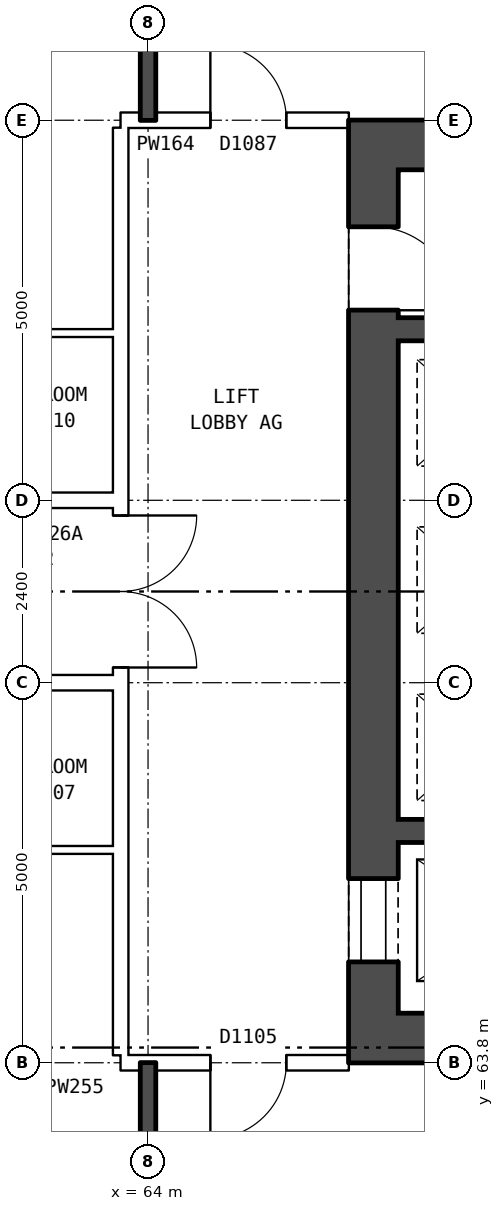
"""IFC4 building model, lengths in metres.
Left out: names, types, materials, properties, quantities, classifications, styles, units other than length and angle.
Written with IfcOpenShell. Run it as: python <this file> out.ifc"""

import sys

from ifc_helpers import new_model, si_unit, direction, frame, frame_2d, origin, place, context, subcontext, project, spatial, rectangle, extrude, element, fill, save


model = new_model("IFC4")
c1 = context("Model", 3, precision=1e-05, world=origin(), true_north=direction((0.0, 1.0)))
c2 = subcontext(c1, "Body", "Model", "MODEL_VIEW")
j1 = project(units=[si_unit("LENGTHUNIT", "METRE"), si_unit("PLANEANGLEUNIT", "RADIAN")], contexts=[c1])
p1 = place(None, origin())
s1 = spatial("IfcSite", under=j1, at=p1, CompositionType="ELEMENT")
p2 = place(p1, origin())
s2 = spatial("IfcBuilding", under=s1, at=p2, CompositionType="ELEMENT")
p3 = place(p2, frame((0.0, 0.0, 96.4)))
s3 = spatial("IfcBuildingStorey", under=s2, at=p3, CompositionType="ELEMENT", Elevation=96.4)
p4 = place(p3, frame((66.965, 64.45, 0.0), z_axis=(0.0, 0.0, 1.0), x_axis=(0.0, 1.0, 0.0)))
e1 = element("IfcWall", 1, at=p4, inside=s3, PredefinedType="SHEAR", context=c2, shape_type="SweptSolid", body=[
    extrude(rectangle(XDim=11.1, YDim=0.65, at=frame_2d((5.55, 0.0))), origin(), (0.0, 0.0, 1.0), 2.85),
])
p5 = place(p4, frame((0.675, 0.0, 0.0)))
e2 = element("IfcOpeningElement", 2, at=p5, cuts=e1, PredefinedType="OPENING", context=c2, shape_type="SweptSolid", body=[
    extrude(rectangle(XDim=1.1, YDim=2.1, at=frame_2d((0.55, 1.05))), frame((0.0, 0.335, 0.0), z_axis=(0.0, -1.0, 0.0), x_axis=(1.0, 0.0, 0.0)), (0.0, 0.0, 1.0), 0.67),
])
p6 = place(p4, frame((9.25, 0.0, 0.0)))
e3 = element("IfcOpeningElement", 3, at=p6, cuts=e1, PredefinedType="OPENING", context=c2, shape_type="SweptSolid", body=[
    extrude(rectangle(XDim=1.1, YDim=2.1, at=frame_2d((0.55, 1.05))), frame((0.0, 0.335, 0.0), z_axis=(0.0, -1.0, 0.0), x_axis=(1.0, 0.0, 0.0)), (0.0, 0.0, 1.0), 0.67),
])
for number, where, z_axis, x_axis in (
    (4, (66.64, 64.125, 0.0), (0.0, 0.0, 1.0), (1.0, 0.0, 0.0)),
    (5, (66.64, 75.875, 0.0), (0.0, 0.0, 1.0), (1.0, 0.0, 0.0)),
):
    element("IfcWall", number, at=place(p3, frame(where, z_axis=z_axis, x_axis=x_axis)), inside=s3, PredefinedType="SHEAR", context=c2, shape_type="SweptSolid", body=[
        extrude(rectangle(XDim=9.0, YDim=0.65, at=frame_2d((4.5, 0.0))), origin(), (0.0, 0.0, 1.0), 2.85),
    ])
p7 = place(p3, frame((67.29, 66.85, 0.0), z_axis=(0.0, 0.0, 1.0), x_axis=(1.0, 0.0, 0.0)))
e6 = element("IfcWall", 6, at=p7, inside=s3, PredefinedType="SHEAR", context=c2, shape_type="SweptSolid", body=[
    extrude(rectangle(XDim=3.37, YDim=0.3, at=frame_2d((1.685, 0.0))), origin(), (0.0, 0.0, 1.0), 2.85),
])
p8 = place(p3, frame((67.29, 73.45, 0.0), z_axis=(0.0, 0.0, 1.0), x_axis=(1.0, 0.0, 0.0)))
e7 = element("IfcWall", 7, at=p8, inside=s3, PredefinedType="SHEAR", context=c2, shape_type="SweptSolid", body=[
    extrude(rectangle(XDim=2.25, YDim=0.3, at=frame_2d((1.125, 0.0))), origin(), (0.0, 0.0, 1.0), 2.85),
])
p9 = place(p3, frame((63.64, 63.9, 0.0), z_axis=(0.0, 0.0, 1.0), x_axis=(0.0, 1.0, 0.0)))
e8 = element("IfcWall", 8, at=p9, inside=s3, PredefinedType="PARTITIONING", context=c2, shape_type="SweptSolid", body=[
    extrude(rectangle(XDim=12.2, YDim=0.2, at=frame_2d((6.1, 0.0))), origin(), (0.0, 0.0, 1.0), 2.85),
])
p10 = place(p9, frame((5.1, 0.0, 0.0)))
e9 = element("IfcOpeningElement", 9, at=p10, cuts=e8, PredefinedType="OPENING", context=c2, shape_type="SweptSolid", body=[
    extrude(rectangle(XDim=2.0, YDim=2.1, at=frame_2d((1.0, 1.05))), frame((0.0, 0.11, 0.0), z_axis=(0.0, -1.0, 0.0), x_axis=(1.0, 0.0, 0.0)), (0.0, 0.0, 1.0), 0.22),
])
p11 = place(p3, frame((63.64, 63.8, 0.0), z_axis=(0.0, 0.0, 1.0), x_axis=(1.0, 0.0, 0.0)))
e10 = element("IfcWall", 10, at=p11, inside=s3, PredefinedType="PARTITIONING", context=c2, shape_type="SweptSolid", body=[
    extrude(rectangle(XDim=3.0, YDim=0.2, at=frame_2d((1.5, 0.0))), origin(), (0.0, 0.0, 1.0), 2.85),
])
p12 = place(p11, frame((1.18, 0.0, 0.0)))
e11 = element("IfcOpeningElement", 11, at=p12, cuts=e10, PredefinedType="OPENING", context=c2, shape_type="SweptSolid", body=[
    extrude(rectangle(XDim=1.0, YDim=2.1, at=frame_2d((0.5, 1.05))), frame((0.0, 0.11, 0.0), z_axis=(0.0, -1.0, 0.0), x_axis=(1.0, 0.0, 0.0)), (0.0, 0.0, 1.0), 0.22),
])
p13 = place(p3, frame((61.0, 66.6, 0.0), z_axis=(0.0, 0.0, 1.0), x_axis=(1.0, 0.0, 0.0)))
e12 = element("IfcWall", 12, at=p13, inside=s3, PredefinedType="PARTITIONING", context=c2, shape_type="SweptSolid", body=[
    extrude(rectangle(XDim=2.64, YDim=0.1, at=frame_2d((1.32, 0.0))), origin(), (0.0, 0.0, 1.0), 2.85),
])
p14 = place(p3, frame((44.36, 68.8, 0.0), z_axis=(0.0, 0.0, 1.0), x_axis=(1.0, 0.0, 0.0)))
e13 = element("IfcWall", 13, at=p14, inside=s3, PredefinedType="PARTITIONING", context=c2, shape_type="SweptSolid", body=[
    extrude(rectangle(XDim=19.28, YDim=0.2, at=frame_2d((9.64, 0.0))), origin(), (0.0, 0.0, 1.0), 2.85),
])
p15 = place(p14, frame((14.64, 0.0, 0.0)))
e14 = element("IfcOpeningElement", 14, at=p15, cuts=e13, PredefinedType="OPENING", context=c2, shape_type="SweptSolid", body=[
    extrude(rectangle(XDim=1.0, YDim=2.1, at=frame_2d((0.5, 1.05))), frame((0.0, 0.11, 0.0), z_axis=(0.0, -1.0, 0.0), x_axis=(1.0, 0.0, 0.0)), (0.0, 0.0, 1.0), 0.22),
])
p16 = place(p14, frame((11.64, 0.0, 0.0)))
e15 = element("IfcOpeningElement", 15, at=p16, cuts=e13, PredefinedType="OPENING", context=c2, shape_type="SweptSolid", body=[
    extrude(rectangle(XDim=1.0, YDim=2.1, at=frame_2d((0.5, 1.05))), frame((0.0, 0.11, 0.0), z_axis=(0.0, -1.0, 0.0), x_axis=(1.0, 0.0, 0.0)), (0.0, 0.0, 1.0), 0.22),
])
p17 = place(p14, frame((5.64, 0.0, 0.0)))
e16 = element("IfcOpeningElement", 16, at=p17, cuts=e13, PredefinedType="OPENING", context=c2, shape_type="SweptSolid", body=[
    extrude(rectangle(XDim=1.0, YDim=2.1, at=frame_2d((0.5, 1.05))), frame((0.0, 0.11, 0.0), z_axis=(0.0, -1.0, 0.0), x_axis=(1.0, 0.0, 0.0)), (0.0, 0.0, 1.0), 0.22),
])
p18 = place(p3, frame((44.36, 71.2, 0.0), z_axis=(0.0, 0.0, 1.0), x_axis=(1.0, 0.0, 0.0)))
e17 = element("IfcWall", 17, at=p18, inside=s3, PredefinedType="PARTITIONING", context=c2, shape_type="SweptSolid", body=[
    extrude(rectangle(XDim=19.28, YDim=0.2, at=frame_2d((9.64, 0.0))), origin(), (0.0, 0.0, 1.0), 2.85),
])
p19 = place(p18, frame((14.64, 0.0, 0.0)))
e18 = element("IfcOpeningElement", 18, at=p19, cuts=e17, PredefinedType="OPENING", context=c2, shape_type="SweptSolid", body=[
    extrude(rectangle(XDim=1.0, YDim=2.1, at=frame_2d((0.5, 1.05))), frame((0.0, 0.11, 0.0), z_axis=(0.0, -1.0, 0.0), x_axis=(1.0, 0.0, 0.0)), (0.0, 0.0, 1.0), 0.22),
])
p20 = place(p18, frame((5.64, 0.0, 0.0)))
e19 = element("IfcOpeningElement", 19, at=p20, cuts=e17, PredefinedType="OPENING", context=c2, shape_type="SweptSolid", body=[
    extrude(rectangle(XDim=1.0, YDim=2.1, at=frame_2d((0.5, 1.05))), frame((0.0, 0.11, 0.0), z_axis=(0.0, -1.0, 0.0), x_axis=(1.0, 0.0, 0.0)), (0.0, 0.0, 1.0), 0.22),
])
p21 = place(p3, frame((61.0, 73.4, 0.0), z_axis=(0.0, 0.0, 1.0), x_axis=(1.0, 0.0, 0.0)))
e20 = element("IfcWall", 20, at=p21, inside=s3, PredefinedType="PARTITIONING", context=c2, shape_type="SweptSolid", body=[
    extrude(rectangle(XDim=2.64, YDim=0.1, at=frame_2d((1.32, 0.0))), origin(), (0.0, 0.0, 1.0), 2.85),
])
p22 = place(p3, frame((63.64, 76.2, 0.0), z_axis=(0.0, 0.0, 1.0), x_axis=(1.0, 0.0, 0.0)))
e21 = element("IfcWall", 21, at=p22, inside=s3, PredefinedType="PARTITIONING", context=c2, shape_type="SweptSolid", body=[
    extrude(rectangle(XDim=3.0, YDim=0.2, at=frame_2d((1.5, 0.0))), origin(), (0.0, 0.0, 1.0), 2.85),
])
p23 = place(p22, frame((1.18, 0.0, 0.0)))
e22 = element("IfcOpeningElement", 22, at=p23, cuts=e21, PredefinedType="OPENING", context=c2, shape_type="SweptSolid", body=[
    extrude(rectangle(XDim=1.0, YDim=2.1, at=frame_2d((0.5, 1.05))), frame((0.0, 0.11, 0.0), z_axis=(0.0, -1.0, 0.0), x_axis=(1.0, 0.0, 0.0)), (0.0, 0.0, 1.0), 0.22),
])
for number, where, z_axis, x_axis in (
    (23, (64.0, 54.36, 0.0), (0.0, 0.0, 1.0), (0.0, 1.0, 0.0)),
    (24, (64.0, 76.2, 0.0), (0.0, 0.0, 1.0), (0.0, 1.0, 0.0)),
):
    element("IfcWall", number, at=place(p3, frame(where, z_axis=z_axis, x_axis=x_axis)), inside=s3, PredefinedType="SOLIDWALL", context=c2, shape_type="SweptSolid", body=[
        extrude(rectangle(XDim=9.44, YDim=0.2, at=frame_2d((4.72, 0.0))), origin(), (0.0, 0.0, 1.0), 2.85),
    ])
p24 = place(p5, origin())
e25 = element("IfcDoor", 25, at=p24, inside=s3, OperationType="DOUBLE_DOOR_SLIDING", PredefinedType="DOOR", context=c2, shape_type="SweptSolid", body=[
    extrude(rectangle(XDim=1.1, YDim=2.1, at=frame_2d((0.55, 1.05))), frame((0.0, -0.26, 0.0), z_axis=(0.0, -1.0, 0.0), x_axis=(1.0, 0.0, 0.0)), (0.0, 0.0, 1.0), 0.05),
])
fill(e2, e25)
p25 = place(p6, frame((1.1, 0.0, 0.0), z_axis=(0.0, 0.0, 1.0), x_axis=(-1.0, 0.0, 0.0)))
e26 = element("IfcDoor", 26, at=p25, inside=s3, OperationType="SINGLE_SWING_RIGHT", PredefinedType="DOOR", context=c2, shape_type="SweptSolid", body=[
    extrude(rectangle(XDim=1.1, YDim=2.1, at=frame_2d((0.55, 1.05))), frame((0.0, 0.31, 0.0), z_axis=(0.0, -1.0, 0.0), x_axis=(1.0, 0.0, 0.0)), (0.0, 0.0, 1.0), 0.05),
])
fill(e3, e26)
p26 = place(p10, frame((2.0, 0.0, 0.0), z_axis=(0.0, 0.0, 1.0), x_axis=(-1.0, 0.0, 0.0)))
e27 = element("IfcDoor", 27, at=p26, inside=s3, OperationType="DOUBLE_DOOR_SINGLE_SWING", PredefinedType="DOOR", context=c2, shape_type="SweptSolid", body=[
    extrude(rectangle(XDim=2.0, YDim=2.1, at=frame_2d((1.0, 1.05))), frame((0.0, 0.025, 0.0), z_axis=(0.0, -1.0, 0.0), x_axis=(1.0, 0.0, 0.0)), (0.0, 0.0, 1.0), 0.05),
])
fill(e9, e27)
p27 = place(p12, frame((1.0, 0.0, 0.0), z_axis=(0.0, 0.0, 1.0), x_axis=(-1.0, 0.0, 0.0)))
e28 = element("IfcDoor", 28, at=p27, inside=s3, OperationType="SINGLE_SWING_RIGHT", PredefinedType="DOOR", context=c2, shape_type="SweptSolid", body=[
    extrude(rectangle(XDim=1.0, YDim=2.1, at=frame_2d((0.5, 1.05))), frame((0.0, 0.025, 0.0), z_axis=(0.0, -1.0, 0.0), x_axis=(1.0, 0.0, 0.0)), (0.0, 0.0, 1.0), 0.05),
])
fill(e11, e28)
p28 = place(p23, origin())
e29 = element("IfcDoor", 29, at=p28, inside=s3, OperationType="SINGLE_SWING_LEFT", PredefinedType="DOOR", context=c2, shape_type="SweptSolid", body=[
    extrude(rectangle(XDim=1.0, YDim=2.1, at=frame_2d((0.5, 1.05))), frame((0.0, 0.025, 0.0), z_axis=(0.0, -1.0, 0.0), x_axis=(1.0, 0.0, 0.0)), (0.0, 0.0, 1.0), 0.05),
])
fill(e22, e29)
save(model, sys.argv[1])
